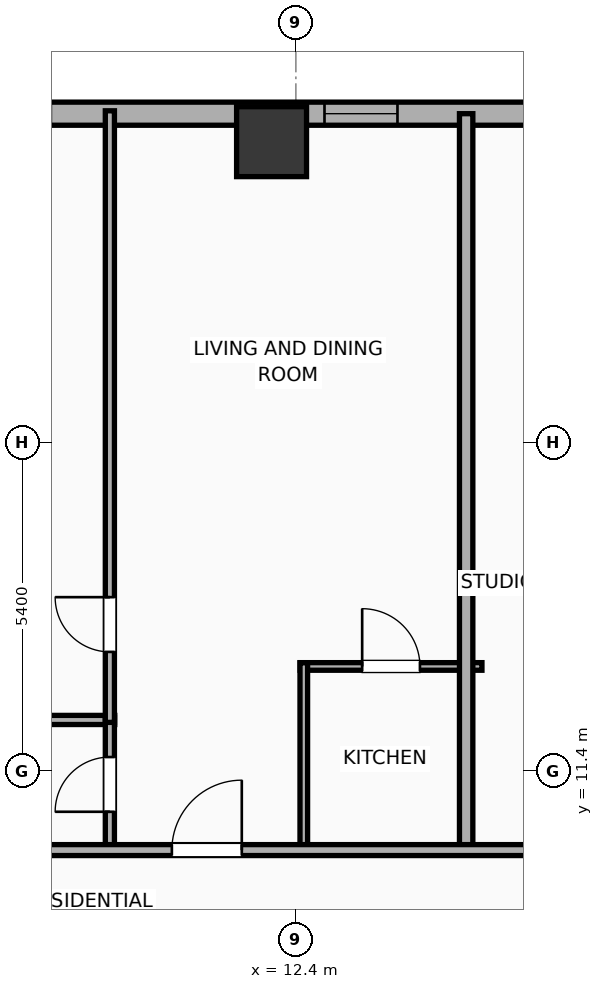
"""IFC4 building model, lengths in metres.
Left out: names, types, materials, properties, quantities, classifications, styles, units other than length and angle.
Written with IfcOpenShell. Run it as: python <this file> out.ifc"""

import sys

from ifc_helpers import new_model, si_unit, direction, frame, frame_2d, origin, origin_2d, place, context, subcontext, project, spatial, rectangle, hollow_rectangle, extrude, element, fill, save


model = new_model("IFC4")
c1 = context("Model", 3, precision=1e-05, world=origin(), true_north=direction((0.0, 1.0)))
c2 = subcontext(c1, "Body", "Model", "MODEL_VIEW")
j1 = project(units=[si_unit("LENGTHUNIT", "METRE"), si_unit("PLANEANGLEUNIT", "RADIAN")], contexts=[c1])
p1 = place(None, origin())
s1 = spatial("IfcSite", under=j1, at=p1, CompositionType="ELEMENT")
p2 = place(p1, origin())
s2 = spatial("IfcBuilding", under=s1, at=p2, CompositionType="ELEMENT")
p3 = place(p2, frame((0.0, 0.0, 33.8)))
s3 = spatial("IfcBuildingStorey", under=s2, at=p3, CompositionType="ELEMENT", Elevation=33.8)
p4 = place(p3, frame((12.0, 21.75, 0.0), z_axis=(0.0, 0.0, 1.0), x_axis=(1.0, 0.0, 0.0)))
e1 = element("IfcColumn", 1, at=p4, inside=s3, PredefinedType="COLUMN", context=c2, shape_type="SweptSolid", body=[
    extrude(hollow_rectangle(XDim=1.15, YDim=1.15, WallThickness=0.04, at=origin_2d()), origin(), (0.0, 0.0, 1.0), 3.9),
])
p5 = place(p3, frame((-29.581, 22.21, 0.0), z_axis=(0.0, 0.0, 1.0), x_axis=(1.0, 0.0, 0.0)))
e2 = element("IfcWall", 2, at=p5, inside=s3, PredefinedType="ELEMENTEDWALL", context=c2, shape_type="SweptSolid", body=[
    extrude(rectangle(XDim=51.963, YDim=0.38, at=frame_2d((25.981, 0.0))), origin(), (0.0, 0.0, 1.0), 3.65),
])
p6 = place(p5, frame((5.81, 0.0, 0.75)))
e3 = element("IfcOpeningElement", 3, at=p6, cuts=e2, PredefinedType="OPENING", context=c2, shape_type="SweptSolid", body=[
    extrude(rectangle(XDim=2.4, YDim=2.1, at=frame_2d((1.2, 1.05))), frame((0.0, 0.2, 0.0), z_axis=(0.0, -1.0, 0.0), x_axis=(1.0, 0.0, 0.0)), (0.0, 0.0, 1.0), 0.4),
])
p7 = place(p5, frame((23.931, 0.0, 0.75)))
e4 = element("IfcOpeningElement", 4, at=p7, cuts=e2, PredefinedType="OPENING", context=c2, shape_type="SweptSolid", body=[
    extrude(rectangle(XDim=2.4, YDim=2.1, at=frame_2d((1.2, 1.05))), frame((0.0, 0.2, 0.0), z_axis=(0.0, -1.0, 0.0), x_axis=(1.0, 0.0, 0.0)), (0.0, 0.0, 1.0), 0.4),
])
p8 = place(p5, frame((3.056, 0.0, 0.75)))
e5 = element("IfcOpeningElement", 5, at=p8, cuts=e2, PredefinedType="OPENING", context=c2, shape_type="SweptSolid", body=[
    extrude(rectangle(XDim=1.2, YDim=2.05, at=frame_2d((0.6, 1.025))), frame((0.0, 0.2, 0.0), z_axis=(0.0, -1.0, 0.0), x_axis=(1.0, 0.0, 0.0)), (0.0, 0.0, 1.0), 0.4),
])
p9 = place(p5, frame((11.127, 0.0, 0.75)))
e6 = element("IfcOpeningElement", 6, at=p9, cuts=e2, PredefinedType="OPENING", context=c2, shape_type="SweptSolid", body=[
    extrude(rectangle(XDim=0.52, YDim=2.05, at=frame_2d((0.26, 1.025))), frame((0.0, 0.2, 0.0), z_axis=(0.0, -1.0, 0.0), x_axis=(1.0, 0.0, 0.0)), (0.0, 0.0, 1.0), 0.4),
])
p10 = place(p5, frame((14.327, 0.0, 0.75)))
e7 = element("IfcOpeningElement", 7, at=p10, cuts=e2, PredefinedType="OPENING", context=c2, shape_type="SweptSolid", body=[
    extrude(rectangle(XDim=1.2, YDim=2.05, at=frame_2d((0.6, 1.025))), frame((0.0, 0.2, 0.0), z_axis=(0.0, -1.0, 0.0), x_axis=(1.0, 0.0, 0.0)), (0.0, 0.0, 1.0), 0.4),
])
p11 = place(p5, frame((21.641, 0.0, 0.75)))
e8 = element("IfcOpeningElement", 8, at=p11, cuts=e2, PredefinedType="OPENING", context=c2, shape_type="SweptSolid", body=[
    extrude(rectangle(XDim=1.2, YDim=2.05, at=frame_2d((0.6, 1.025))), frame((0.0, 0.2, 0.0), z_axis=(0.0, -1.0, 0.0), x_axis=(1.0, 0.0, 0.0)), (0.0, 0.0, 1.0), 0.4),
])
p12 = place(p5, frame((18.486, 0.0, 0.75)))
e9 = element("IfcOpeningElement", 9, at=p12, cuts=e2, PredefinedType="OPENING", context=c2, shape_type="SweptSolid", body=[
    extrude(rectangle(XDim=1.2, YDim=2.05, at=frame_2d((0.6, 1.025))), frame((0.0, 0.2, 0.0), z_axis=(0.0, -1.0, 0.0), x_axis=(1.0, 0.0, 0.0)), (0.0, 0.0, 1.0), 0.4),
])
p13 = place(p5, frame((28.976, 0.0, 0.75)))
e10 = element("IfcOpeningElement", 10, at=p13, cuts=e2, PredefinedType="OPENING", context=c2, shape_type="SweptSolid", body=[
    extrude(rectangle(XDim=1.2, YDim=2.05, at=frame_2d((0.6, 1.025))), frame((0.0, 0.2, 0.0), z_axis=(0.0, -1.0, 0.0), x_axis=(1.0, 0.0, 0.0)), (0.0, 0.0, 1.0), 0.4),
])
p14 = place(p5, frame((33.476, 0.0, 0.75)))
e11 = element("IfcOpeningElement", 11, at=p14, cuts=e2, PredefinedType="OPENING", context=c2, shape_type="SweptSolid", body=[
    extrude(rectangle(XDim=1.2, YDim=2.05, at=frame_2d((0.6, 1.025))), frame((0.0, 0.2, 0.0), z_axis=(0.0, -1.0, 0.0), x_axis=(1.0, 0.0, 0.0)), (0.0, 0.0, 1.0), 0.4),
])
p15 = place(p5, frame((36.752, 0.0, 0.75)))
e12 = element("IfcOpeningElement", 12, at=p15, cuts=e2, PredefinedType="OPENING", context=c2, shape_type="SweptSolid", body=[
    extrude(rectangle(XDim=1.2, YDim=2.05, at=frame_2d((0.6, 1.025))), frame((0.0, 0.2, 0.0), z_axis=(0.0, -1.0, 0.0), x_axis=(1.0, 0.0, 0.0)), (0.0, 0.0, 1.0), 0.4),
])
p16 = place(p5, frame((42.452, 0.0, 0.75)))
e13 = element("IfcOpeningElement", 13, at=p16, cuts=e2, PredefinedType="OPENING", context=c2, shape_type="SweptSolid", body=[
    extrude(rectangle(XDim=1.2, YDim=2.05, at=frame_2d((0.6, 1.025))), frame((0.0, 0.2, 0.0), z_axis=(0.0, -1.0, 0.0), x_axis=(1.0, 0.0, 0.0)), (0.0, 0.0, 1.0), 0.4),
])
p17 = place(p5, frame((45.831, 0.0, 0.75)))
e14 = element("IfcOpeningElement", 14, at=p17, cuts=e2, PredefinedType="OPENING", context=c2, shape_type="SweptSolid", body=[
    extrude(rectangle(XDim=1.2, YDim=2.05, at=frame_2d((0.6, 1.025))), frame((0.0, 0.2, 0.0), z_axis=(0.0, -1.0, 0.0), x_axis=(1.0, 0.0, 0.0)), (0.0, 0.0, 1.0), 0.4),
])
p18 = place(p5, frame((48.585, 0.0, 0.75)))
e15 = element("IfcOpeningElement", 15, at=p18, cuts=e2, PredefinedType="OPENING", context=c2, shape_type="SweptSolid", body=[
    extrude(rectangle(XDim=1.2, YDim=2.05, at=frame_2d((0.6, 1.025))), frame((0.0, 0.2, 0.0), z_axis=(0.0, -1.0, 0.0), x_axis=(1.0, 0.0, 0.0)), (0.0, 0.0, 1.0), 0.4),
])
p19 = place(p5, frame((50.421, 0.0, 0.75)))
e16 = element("IfcOpeningElement", 16, at=p19, cuts=e2, PredefinedType="OPENING", context=c2, shape_type="SweptSolid", body=[
    extrude(rectangle(XDim=0.52, YDim=2.05, at=frame_2d((0.26, 1.025))), frame((0.0, 0.2, 0.0), z_axis=(0.0, -1.0, 0.0), x_axis=(1.0, 0.0, 0.0)), (0.0, 0.0, 1.0), 0.4),
])
p20 = place(p3, frame((5.94, 12.24, 0.0), z_axis=(0.0, 0.0, 1.0), x_axis=(1.0, 0.0, 0.0)))
e17 = element("IfcWall", 17, at=p20, inside=s3, PredefinedType="PLUMBINGWALL", context=c2, shape_type="SweptSolid", body=[
    extrude(rectangle(XDim=3.481, YDim=0.15, at=frame_2d((1.74, 0.0))), origin(), (0.0, 0.0, 1.0), 3.65),
])
p21 = place(p3, frame((9.341, 10.08, 0.0), z_axis=(0.0, 0.0, 1.0), x_axis=(0.0, 1.0, 0.0)))
e18 = element("IfcWall", 18, at=p21, inside=s3, PredefinedType="PLUMBINGWALL", context=c2, shape_type="SweptSolid", body=[
    extrude(rectangle(XDim=2.2, YDim=0.15, at=frame_2d((1.1, 0.0))), origin(), (0.0, 0.0, 1.0), 3.65),
])
p22 = place(p21, frame((0.65, 0.0, 0.0)))
e19 = element("IfcOpeningElement", 19, at=p22, cuts=e18, PredefinedType="OPENING", context=c2, shape_type="SweptSolid", body=[
    extrude(rectangle(XDim=0.9, YDim=2.05, at=frame_2d((0.45, 1.025))), frame((0.0, 0.085, 0.0), z_axis=(0.0, -1.0, 0.0), x_axis=(1.0, 0.0, 0.0)), (0.0, 0.0, 1.0), 0.17),
])
p23 = place(p3, frame((9.341, 12.2, 0.0), z_axis=(0.0, 0.0, 1.0), x_axis=(0.0, 1.0, 0.0)))
e20 = element("IfcWall", 20, at=p23, inside=s3, PredefinedType="PLUMBINGWALL", context=c2, shape_type="SweptSolid", body=[
    extrude(rectangle(XDim=10.058, YDim=0.15, at=frame_2d((5.029, 0.0))), origin(), (0.0, 0.0, 1.0), 3.65),
])
p24 = place(p23, frame((1.159, 0.0, 0.0)))
e21 = element("IfcOpeningElement", 21, at=p24, cuts=e20, PredefinedType="OPENING", context=c2, shape_type="SweptSolid", body=[
    extrude(rectangle(XDim=0.9, YDim=2.05, at=frame_2d((0.45, 1.025))), frame((0.0, 0.085, 0.0), z_axis=(0.0, -1.0, 0.0), x_axis=(1.0, 0.0, 0.0)), (0.0, 0.0, 1.0), 0.17),
])
p25 = place(p3, frame((12.47, 13.12, 0.0), z_axis=(0.0, 0.0, 1.0), x_axis=(1.0, 0.0, 0.0)))
e22 = element("IfcWall", 22, at=p25, inside=s3, PredefinedType="PARTITIONING", context=c2, shape_type="SweptSolid", body=[
    extrude(rectangle(XDim=2.99, YDim=0.125, at=frame_2d((1.495, 0.0))), origin(), (0.0, 0.0, 1.0), 3.65),
])
p26 = place(p25, frame((1.02, 0.0, 0.0)))
e23 = element("IfcOpeningElement", 23, at=p26, cuts=e22, PredefinedType="OPENING", context=c2, shape_type="SweptSolid", body=[
    extrude(rectangle(XDim=0.95, YDim=2.05, at=frame_2d((0.475, 1.025))), frame((0.0, 0.073, 0.0), z_axis=(0.0, -1.0, 0.0), x_axis=(1.0, 0.0, 0.0)), (0.0, 0.0, 1.0), 0.145),
])
p27 = place(p3, frame((12.53, 10.08, 0.0), z_axis=(0.0, 0.0, 1.0), x_axis=(0.0, 1.0, 0.0)))
e24 = element("IfcWall", 24, at=p27, inside=s3, PredefinedType="PARTITIONING", context=c2, shape_type="SweptSolid", body=[
    extrude(rectangle(XDim=3.1, YDim=0.125, at=frame_2d((1.55, 0.0))), origin(), (0.0, 0.0, 1.0), 2.94),
])
p28 = place(p3, frame((15.2, 10.02, 0.0), z_axis=(0.0, 0.0, 1.0), x_axis=(0.0, 1.0, 0.0)))
e25 = element("IfcWall", 25, at=p28, inside=s3, PredefinedType="PARTITIONING", context=c2, shape_type="SweptSolid", body=[
    extrude(rectangle(XDim=12.19, YDim=0.22, at=frame_2d((6.095, 0.0))), origin(), (0.0, 0.0, 1.0), 3.65),
])
p29 = place(p3, frame((-33.41, 10.1, 0.0), z_axis=(0.0, 0.0, 1.0), x_axis=(1.0, 0.0, 0.0)))
e26 = element("IfcWall", 26, at=p29, inside=s3, PredefinedType="PARTITIONING", context=c2, shape_type="SweptSolid", body=[
    extrude(rectangle(XDim=59.62, YDim=0.18, at=frame_2d((29.81, 0.0))), origin(), (0.0, 0.0, 1.0), 3.65),
])
p30 = place(p29, frame((2.793, 0.0, 0.0)))
e27 = element("IfcOpeningElement", 27, at=p30, cuts=e26, PredefinedType="OPENING", context=c2, shape_type="SweptSolid", body=[
    extrude(rectangle(XDim=0.9, YDim=2.05, at=frame_2d((0.45, 1.025))), frame((0.0, 0.1, 0.0), z_axis=(0.0, -1.0, 0.0), x_axis=(1.0, 0.0, 0.0)), (0.0, 0.0, 1.0), 0.2),
])
p31 = place(p29, frame((10.037, 0.0, 0.0)))
e28 = element("IfcOpeningElement", 28, at=p31, cuts=e26, PredefinedType="OPENING", context=c2, shape_type="SweptSolid", body=[
    extrude(rectangle(XDim=1.15, YDim=2.05, at=frame_2d((0.575, 1.025))), frame((0.0, 0.1, 0.0), z_axis=(0.0, -1.0, 0.0), x_axis=(1.0, 0.0, 0.0)), (0.0, 0.0, 1.0), 0.2),
])
p32 = place(p29, frame((16.882, 0.0, 0.0)))
e29 = element("IfcOpeningElement", 29, at=p32, cuts=e26, PredefinedType="OPENING", context=c2, shape_type="SweptSolid", body=[
    extrude(rectangle(XDim=1.15, YDim=2.05, at=frame_2d((0.575, 1.025))), frame((0.0, 0.1, 0.0), z_axis=(0.0, -1.0, 0.0), x_axis=(1.0, 0.0, 0.0)), (0.0, 0.0, 1.0), 0.2),
])
p33 = place(p29, frame((25.801, 0.0, 0.0)))
e30 = element("IfcOpeningElement", 30, at=p33, cuts=e26, PredefinedType="OPENING", context=c2, shape_type="SweptSolid", body=[
    extrude(rectangle(XDim=1.15, YDim=2.05, at=frame_2d((0.575, 1.025))), frame((0.0, 0.1, 0.0), z_axis=(0.0, -1.0, 0.0), x_axis=(1.0, 0.0, 0.0)), (0.0, 0.0, 1.0), 0.2),
])
p34 = place(p29, frame((34.72, 0.0, 0.0)))
e31 = element("IfcOpeningElement", 31, at=p34, cuts=e26, PredefinedType="OPENING", context=c2, shape_type="SweptSolid", body=[
    extrude(rectangle(XDim=1.15, YDim=2.05, at=frame_2d((0.575, 1.025))), frame((0.0, 0.1, 0.0), z_axis=(0.0, -1.0, 0.0), x_axis=(1.0, 0.0, 0.0)), (0.0, 0.0, 1.0), 0.2),
])
p35 = place(p29, frame((43.771, 0.0, 0.0)))
e32 = element("IfcOpeningElement", 32, at=p35, cuts=e26, PredefinedType="OPENING", context=c2, shape_type="SweptSolid", body=[
    extrude(rectangle(XDim=1.15, YDim=2.05, at=frame_2d((0.575, 1.025))), frame((0.0, 0.1, 0.0), z_axis=(0.0, -1.0, 0.0), x_axis=(1.0, 0.0, 0.0)), (0.0, 0.0, 1.0), 0.2),
])
p36 = place(p29, frame((49.715, 0.0, 0.0)))
e33 = element("IfcOpeningElement", 33, at=p36, cuts=e26, PredefinedType="OPENING", context=c2, shape_type="SweptSolid", body=[
    extrude(rectangle(XDim=1.15, YDim=2.05, at=frame_2d((0.575, 1.025))), frame((0.0, 0.1, 0.0), z_axis=(0.0, -1.0, 0.0), x_axis=(1.0, 0.0, 0.0)), (0.0, 0.0, 1.0), 0.2),
])
p37 = place(p29, frame((56.654, 0.0, 0.0)))
e34 = element("IfcOpeningElement", 34, at=p37, cuts=e26, PredefinedType="OPENING", context=c2, shape_type="SweptSolid", body=[
    extrude(rectangle(XDim=0.9, YDim=2.05, at=frame_2d((0.45, 1.025))), frame((0.0, 0.1, 0.0), z_axis=(0.0, -1.0, 0.0), x_axis=(1.0, 0.0, 0.0)), (0.0, 0.0, 1.0), 0.2),
])
p38 = place(p16, origin())
e35 = element("IfcWindow", 35, at=p38, inside=s3, PartitioningType="SINGLE_PANEL", PredefinedType="WINDOW", context=c2, shape_type="SweptSolid", body=[
    extrude(rectangle(XDim=1.2, YDim=2.05, at=frame_2d((0.6, 1.025))), frame((0.0, 0.03, 0.0), z_axis=(0.0, -1.0, 0.0), x_axis=(1.0, 0.0, 0.0)), (0.0, 0.0, 1.0), 0.06),
])
fill(e13, e35)
p39 = place(p22, origin())
e36 = element("IfcDoor", 36, at=p39, inside=s3, OperationType="SINGLE_SWING_LEFT", PredefinedType="DOOR", context=c2, shape_type="SweptSolid", body=[
    extrude(rectangle(XDim=0.9, YDim=2.05, at=frame_2d((0.45, 1.025))), frame((0.0, 0.025, 0.0), z_axis=(0.0, -1.0, 0.0), x_axis=(1.0, 0.0, 0.0)), (0.0, 0.0, 1.0), 0.05),
])
fill(e19, e36)
p40 = place(p24, origin())
e37 = element("IfcDoor", 37, at=p40, inside=s3, OperationType="SINGLE_SWING_RIGHT", PredefinedType="DOOR", context=c2, shape_type="SweptSolid", body=[
    extrude(rectangle(XDim=0.9, YDim=2.05, at=frame_2d((0.45, 1.025))), frame((0.0, 0.025, 0.0), z_axis=(0.0, -1.0, 0.0), x_axis=(1.0, 0.0, 0.0)), (0.0, 0.0, 1.0), 0.05),
])
fill(e21, e37)
p41 = place(p26, origin())
e38 = element("IfcDoor", 38, at=p41, inside=s3, OperationType="SINGLE_SWING_LEFT", PredefinedType="DOOR", context=c2, shape_type="SweptSolid", body=[
    extrude(rectangle(XDim=0.95, YDim=2.05, at=frame_2d((0.475, 1.025))), frame((0.0, 0.025, 0.0), z_axis=(0.0, -1.0, 0.0), x_axis=(1.0, 0.0, 0.0)), (0.0, 0.0, 1.0), 0.05),
])
fill(e23, e38)
p42 = place(p35, origin())
e39 = element("IfcDoor", 39, at=p42, inside=s3, OperationType="SINGLE_SWING_RIGHT", PredefinedType="DOOR", context=c2, shape_type="SweptSolid", body=[
    extrude(rectangle(XDim=1.15, YDim=2.05, at=frame_2d((0.575, 1.025))), frame((0.0, 0.025, 0.0), z_axis=(0.0, -1.0, 0.0), x_axis=(1.0, 0.0, 0.0)), (0.0, 0.0, 1.0), 0.05),
])
fill(e32, e39)
save(model, sys.argv[1])
